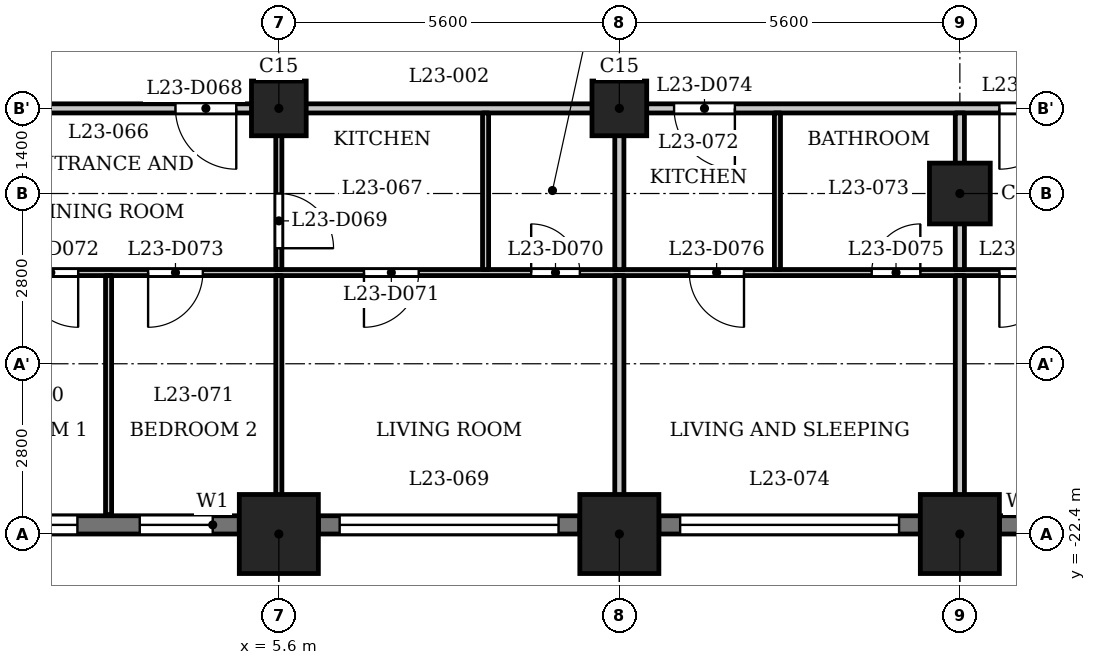
"""IFC4 building model, lengths in metres.
Left out: names, types, materials, properties, quantities, classifications, styles, units other than length and angle.
Written with IfcOpenShell. Run it as: python <this file> out.ifc"""

import sys

from ifc_helpers import new_model, si_unit, direction, frame, frame_2d, origin, origin_2d, place, context, subcontext, project, spatial, rectangle, extrude, element, fill, save


model = new_model("IFC4")
c1 = context("Model", 3, precision=1e-05, world=origin(), true_north=direction((0.0, 1.0)))
c2 = subcontext(c1, "Body", "Model", "MODEL_VIEW")
j1 = project(units=[si_unit("LENGTHUNIT", "METRE"), si_unit("PLANEANGLEUNIT", "RADIAN")], contexts=[c1])
p1 = place(None, origin())
s1 = spatial("IfcSite", under=j1, at=p1, CompositionType="ELEMENT")
p2 = place(p1, origin())
s2 = spatial("IfcBuilding", under=s1, at=p2, CompositionType="ELEMENT")
p3 = place(p2, frame((0.0, 0.0, 93.8)))
s3 = spatial("IfcBuildingStorey", under=s2, at=p3, CompositionType="ELEMENT", Elevation=93.8)
for number, where, z_axis, x_axis in (
    (1, (5.6, -22.4, 0.0), (0.0, 0.0, 1.0), (1.0, 0.0, 0.0)),
    (2, (11.2, -22.4, 0.0), (0.0, 0.0, 1.0), (1.0, 0.0, 0.0)),
    (3, (16.8, -22.4, 0.0), (0.0, 0.0, 1.0), (1.0, 0.0, 0.0)),
):
    element("IfcColumn", number, at=place(p3, frame(where, z_axis=z_axis, x_axis=x_axis)), inside=s3, PredefinedType="COLUMN", context=c2, shape_type="SweptSolid", body=[
        extrude(rectangle(XDim=1.3, YDim=1.3, at=origin_2d()), origin(), (0.0, 0.0, 1.0), 3.5),
    ])
p4 = place(p3, frame((16.8, -16.8, 0.0), z_axis=(0.0, 0.0, 1.0), x_axis=(1.0, 0.0, 0.0)))
e4 = element("IfcColumn", 4, at=p4, inside=s3, PredefinedType="COLUMN", context=c2, shape_type="SweptSolid", body=[
    extrude(rectangle(XDim=1.0, YDim=1.0, at=origin_2d()), origin(), (0.0, 0.0, 1.0), 3.5),
])
for number, where, z_axis, x_axis in (
    (5, (5.6, -15.4, 0.0), (0.0, 0.0, 1.0), (1.0, 0.0, 0.0)),
    (6, (11.2, -15.4, 0.0), (0.0, 0.0, 1.0), (1.0, 0.0, 0.0)),
):
    element("IfcColumn", number, at=place(p3, frame(where, z_axis=z_axis, x_axis=x_axis)), inside=s3, PredefinedType="COLUMN", context=c2, shape_type="SweptSolid", body=[
        extrude(rectangle(XDim=0.9, YDim=0.9, at=origin_2d()), origin(), (0.0, 0.0, 1.0), 3.5),
    ])
p5 = place(p3, frame((0.65, -22.25, 0.0), z_axis=(0.0, 0.0, 1.0), x_axis=(1.0, 0.0, 0.0)))
e7 = element("IfcWall", 7, at=p5, inside=s3, PredefinedType="SOLIDWALL", context=c2, shape_type="SweptSolid", body=[
    extrude(rectangle(XDim=4.3, YDim=0.3, at=frame_2d((2.15, 0.0))), origin(), (0.0, 0.0, 1.0), 2.4),
])
p6 = place(p5, frame((0.438, 0.0, 0.6)))
e8 = element("IfcOpeningElement", 8, at=p6, cuts=e7, PredefinedType="OPENING", context=c2, shape_type="SweptSolid", body=[
    extrude(rectangle(XDim=1.2, YDim=1.55, at=frame_2d((0.6, 0.775))), frame((0.0, 0.16, 0.0), z_axis=(0.0, -1.0, 0.0), x_axis=(1.0, 0.0, 0.0)), (0.0, 0.0, 1.0), 0.32),
])
p7 = place(p5, frame((2.663, 0.0, 0.6)))
e9 = element("IfcOpeningElement", 9, at=p7, cuts=e7, PredefinedType="OPENING", context=c2, shape_type="SweptSolid", body=[
    extrude(rectangle(XDim=1.2, YDim=1.55, at=frame_2d((0.6, 0.775))), frame((0.0, 0.16, 0.0), z_axis=(0.0, -1.0, 0.0), x_axis=(1.0, 0.0, 0.0)), (0.0, 0.0, 1.0), 0.32),
])
p8 = place(p3, frame((6.25, -22.25, 0.0), z_axis=(0.0, 0.0, 1.0), x_axis=(1.0, 0.0, 0.0)))
e10 = element("IfcWall", 10, at=p8, inside=s3, PredefinedType="SOLIDWALL", context=c2, shape_type="SweptSolid", body=[
    extrude(rectangle(XDim=4.3, YDim=0.3, at=frame_2d((2.15, 0.0))), origin(), (0.0, 0.0, 1.0), 2.4),
])
p9 = place(p8, frame((0.35, 0.0, 1.2)))
e11 = element("IfcOpeningElement", 11, at=p9, cuts=e10, PredefinedType="OPENING", context=c2, shape_type="SweptSolid", body=[
    extrude(rectangle(XDim=3.6, YDim=0.95, at=frame_2d((1.8, 0.475))), frame((0.0, 0.16, 0.0), z_axis=(0.0, -1.0, 0.0), x_axis=(1.0, 0.0, 0.0)), (0.0, 0.0, 1.0), 0.32),
])
p10 = place(p3, frame((11.85, -22.25, 0.0), z_axis=(0.0, 0.0, 1.0), x_axis=(1.0, 0.0, 0.0)))
e12 = element("IfcWall", 12, at=p10, inside=s3, PredefinedType="SOLIDWALL", context=c2, shape_type="SweptSolid", body=[
    extrude(rectangle(XDim=4.3, YDim=0.3, at=frame_2d((2.15, 0.0))), origin(), (0.0, 0.0, 1.0), 2.4),
])
p11 = place(p10, frame((0.35, 0.0, 1.2)))
e13 = element("IfcOpeningElement", 13, at=p11, cuts=e12, PredefinedType="OPENING", context=c2, shape_type="SweptSolid", body=[
    extrude(rectangle(XDim=3.6, YDim=0.95, at=frame_2d((1.8, 0.475))), frame((0.0, 0.16, 0.0), z_axis=(0.0, -1.0, 0.0), x_axis=(1.0, 0.0, 0.0)), (0.0, 0.0, 1.0), 0.32),
])
p12 = place(p3, frame((17.45, -22.25, 0.0), z_axis=(0.0, 0.0, 1.0), x_axis=(1.0, 0.0, 0.0)))
e14 = element("IfcWall", 14, at=p12, inside=s3, PredefinedType="SOLIDWALL", context=c2, shape_type="SweptSolid", body=[
    extrude(rectangle(XDim=2.55, YDim=0.3, at=frame_2d((1.275, 0.0))), origin(), (0.0, 0.0, 1.0), 2.4),
])
p13 = place(p12, frame((0.375, 0.0, 0.9)))
e15 = element("IfcOpeningElement", 15, at=p13, cuts=e14, PredefinedType="OPENING", context=c2, shape_type="SweptSolid", body=[
    extrude(rectangle(XDim=1.8, YDim=1.25, at=frame_2d((0.9, 0.625))), frame((0.0, 0.16, 0.0), z_axis=(0.0, -1.0, 0.0), x_axis=(1.0, 0.0, 0.0)), (0.0, 0.0, 1.0), 0.32),
])
p14 = place(p3, frame((-26.19, -18.1, 0.0), z_axis=(0.0, 0.0, 1.0), x_axis=(1.0, 0.0, 0.0)))
e16 = element("IfcWall", 16, at=p14, inside=s3, PredefinedType="PARTITIONING", context=c2, shape_type="SweptSolid", body=[
    extrude(rectangle(XDim=52.63, YDim=0.1, at=frame_2d((26.315, 0.0))), origin(), (0.0, 0.0, 1.0), 3.2),
])
p15 = place(p14, frame((1.09, 0.0, 0.0)))
e17 = element("IfcOpeningElement", 17, at=p15, cuts=e16, PredefinedType="OPENING", context=c2, shape_type="SweptSolid", body=[
    extrude(rectangle(XDim=0.8, YDim=2.1, at=frame_2d((0.4, 1.05))), frame((0.0, 0.06, 0.0), z_axis=(0.0, -1.0, 0.0), x_axis=(1.0, 0.0, 0.0)), (0.0, 0.0, 1.0), 0.12),
])
p16 = place(p14, frame((4.44, 0.0, 0.0)))
e18 = element("IfcOpeningElement", 18, at=p16, cuts=e16, PredefinedType="OPENING", context=c2, shape_type="SweptSolid", body=[
    extrude(rectangle(XDim=0.9, YDim=2.1, at=frame_2d((0.45, 1.05))), frame((0.0, 0.06, 0.0), z_axis=(0.0, -1.0, 0.0), x_axis=(1.0, 0.0, 0.0)), (0.0, 0.0, 1.0), 0.12),
])
p17 = place(p14, frame((10.04, 0.0, 0.0)))
e19 = element("IfcOpeningElement", 19, at=p17, cuts=e16, PredefinedType="OPENING", context=c2, shape_type="SweptSolid", body=[
    extrude(rectangle(XDim=0.8, YDim=2.1, at=frame_2d((0.4, 1.05))), frame((0.0, 0.06, 0.0), z_axis=(0.0, -1.0, 0.0), x_axis=(1.0, 0.0, 0.0)), (0.0, 0.0, 1.0), 0.12),
])
p18 = place(p14, frame((15.64, 0.0, 0.0)))
e20 = element("IfcOpeningElement", 20, at=p18, cuts=e16, PredefinedType="OPENING", context=c2, shape_type="SweptSolid", body=[
    extrude(rectangle(XDim=0.9, YDim=2.1, at=frame_2d((0.45, 1.05))), frame((0.0, 0.06, 0.0), z_axis=(0.0, -1.0, 0.0), x_axis=(1.0, 0.0, 0.0)), (0.0, 0.0, 1.0), 0.12),
])
p19 = place(p14, frame((24.74, 0.0, 0.0)))
e21 = element("IfcOpeningElement", 21, at=p19, cuts=e16, PredefinedType="OPENING", context=c2, shape_type="SweptSolid", body=[
    extrude(rectangle(XDim=0.8, YDim=2.1, at=frame_2d((0.4, 1.05))), frame((0.0, 0.06, 0.0), z_axis=(0.0, -1.0, 0.0), x_axis=(1.0, 0.0, 0.0)), (0.0, 0.0, 1.0), 0.12),
])
p20 = place(p14, frame((21.24, 0.0, 0.0)))
e22 = element("IfcOpeningElement", 22, at=p20, cuts=e16, PredefinedType="OPENING", context=c2, shape_type="SweptSolid", body=[
    extrude(rectangle(XDim=0.9, YDim=2.1, at=frame_2d((0.45, 1.05))), frame((0.0, 0.06, 0.0), z_axis=(0.0, -1.0, 0.0), x_axis=(1.0, 0.0, 0.0)), (0.0, 0.0, 1.0), 0.12),
])
p21 = place(p14, frame((35.94, 0.0, 0.0)))
e23 = element("IfcOpeningElement", 23, at=p21, cuts=e16, PredefinedType="OPENING", context=c2, shape_type="SweptSolid", body=[
    extrude(rectangle(XDim=0.8, YDim=2.1, at=frame_2d((0.4, 1.05))), frame((0.0, 0.06, 0.0), z_axis=(0.0, -1.0, 0.0), x_axis=(1.0, 0.0, 0.0)), (0.0, 0.0, 1.0), 0.12),
])
p22 = place(p14, frame((33.19, 0.0, 0.0)))
e24 = element("IfcOpeningElement", 24, at=p22, cuts=e16, PredefinedType="OPENING", context=c2, shape_type="SweptSolid", body=[
    extrude(rectangle(XDim=0.9, YDim=2.1, at=frame_2d((0.45, 1.05))), frame((0.0, 0.06, 0.0), z_axis=(0.0, -1.0, 0.0), x_axis=(1.0, 0.0, 0.0)), (0.0, 0.0, 1.0), 0.12),
])
p23 = place(p14, frame((27.59, 0.0, 0.0)))
e25 = element("IfcOpeningElement", 25, at=p23, cuts=e16, PredefinedType="OPENING", context=c2, shape_type="SweptSolid", body=[
    extrude(rectangle(XDim=0.9, YDim=2.1, at=frame_2d((0.45, 1.05))), frame((0.0, 0.06, 0.0), z_axis=(0.0, -1.0, 0.0), x_axis=(1.0, 0.0, 0.0)), (0.0, 0.0, 1.0), 0.12),
])
p24 = place(p14, frame((29.64, 0.0, 0.0)))
e26 = element("IfcOpeningElement", 26, at=p24, cuts=e16, PredefinedType="OPENING", context=c2, shape_type="SweptSolid", body=[
    extrude(rectangle(XDim=0.9, YDim=2.1, at=frame_2d((0.45, 1.05))), frame((0.0, 0.06, 0.0), z_axis=(0.0, -1.0, 0.0), x_axis=(1.0, 0.0, 0.0)), (0.0, 0.0, 1.0), 0.12),
])
p25 = place(p14, frame((41.54, 0.0, 0.0)))
e27 = element("IfcOpeningElement", 27, at=p25, cuts=e16, PredefinedType="OPENING", context=c2, shape_type="SweptSolid", body=[
    extrude(rectangle(XDim=0.8, YDim=2.1, at=frame_2d((0.4, 1.05))), frame((0.0, 0.06, 0.0), z_axis=(0.0, -1.0, 0.0), x_axis=(1.0, 0.0, 0.0)), (0.0, 0.0, 1.0), 0.12),
])
p26 = place(p14, frame((38.54, 0.0, 0.0)))
e28 = element("IfcOpeningElement", 28, at=p26, cuts=e16, PredefinedType="OPENING", context=c2, shape_type="SweptSolid", body=[
    extrude(rectangle(XDim=0.9, YDim=2.1, at=frame_2d((0.45, 1.05))), frame((0.0, 0.06, 0.0), z_axis=(0.0, -1.0, 0.0), x_axis=(1.0, 0.0, 0.0)), (0.0, 0.0, 1.0), 0.12),
])
p27 = place(p14, frame((49.204, 0.0, 0.0)))
e29 = element("IfcOpeningElement", 29, at=p27, cuts=e16, PredefinedType="OPENING", context=c2, shape_type="SweptSolid", body=[
    extrude(rectangle(XDim=0.8, YDim=2.1, at=frame_2d((0.4, 1.05))), frame((0.0, 0.06, 0.0), z_axis=(0.0, -1.0, 0.0), x_axis=(1.0, 0.0, 0.0)), (0.0, 0.0, 1.0), 0.12),
])
p28 = place(p14, frame((43.64, 0.0, 0.0)))
e30 = element("IfcOpeningElement", 30, at=p28, cuts=e16, PredefinedType="OPENING", context=c2, shape_type="SweptSolid", body=[
    extrude(rectangle(XDim=0.9, YDim=2.1, at=frame_2d((0.45, 1.05))), frame((0.0, 0.06, 0.0), z_axis=(0.0, -1.0, 0.0), x_axis=(1.0, 0.0, 0.0)), (0.0, 0.0, 1.0), 0.12),
])
p29 = place(p3, frame((-27.484, -15.4, 0.0), z_axis=(0.0, 0.0, 1.0), x_axis=(1.0, 0.0, 0.0)))
e31 = element("IfcWall", 31, at=p29, inside=s3, PredefinedType="PARTITIONING", context=c2, shape_type="SweptSolid", body=[
    extrude(rectangle(XDim=54.968, YDim=0.15, at=frame_2d((27.484, 0.0))), origin(), (0.0, 0.0, 1.0), 3.2),
])
p30 = place(p29, frame((5.734, 0.0, 0.0)))
e32 = element("IfcOpeningElement", 32, at=p30, cuts=e31, PredefinedType="OPENING", context=c2, shape_type="SweptSolid", body=[
    extrude(rectangle(XDim=1.0, YDim=2.1, at=frame_2d((0.5, 1.05))), frame((0.0, 0.085, 0.0), z_axis=(0.0, -1.0, 0.0), x_axis=(1.0, 0.0, 0.0)), (0.0, 0.0, 1.0), 0.17),
])
p31 = place(p29, frame((16.934, 0.0, 0.0)))
e33 = element("IfcOpeningElement", 33, at=p31, cuts=e31, PredefinedType="OPENING", context=c2, shape_type="SweptSolid", body=[
    extrude(rectangle(XDim=1.0, YDim=2.1, at=frame_2d((0.5, 1.05))), frame((0.0, 0.085, 0.0), z_axis=(0.0, -1.0, 0.0), x_axis=(1.0, 0.0, 0.0)), (0.0, 0.0, 1.0), 0.17),
])
p32 = place(p29, frame((22.534, 0.0, 0.0)))
e34 = element("IfcOpeningElement", 34, at=p32, cuts=e31, PredefinedType="OPENING", context=c2, shape_type="SweptSolid", body=[
    extrude(rectangle(XDim=1.0, YDim=2.1, at=frame_2d((0.5, 1.05))), frame((0.0, 0.085, 0.0), z_axis=(0.0, -1.0, 0.0), x_axis=(1.0, 0.0, 0.0)), (0.0, 0.0, 1.0), 0.17),
])
p33 = place(p29, frame((31.384, 0.0, 0.0)))
e35 = element("IfcOpeningElement", 35, at=p33, cuts=e31, PredefinedType="OPENING", context=c2, shape_type="SweptSolid", body=[
    extrude(rectangle(XDim=1.0, YDim=2.1, at=frame_2d((0.5, 1.05))), frame((0.0, 0.085, 0.0), z_axis=(0.0, -1.0, 0.0), x_axis=(1.0, 0.0, 0.0)), (0.0, 0.0, 1.0), 0.17),
])
p34 = place(p29, frame((39.584, 0.0, 0.0)))
e36 = element("IfcOpeningElement", 36, at=p34, cuts=e31, PredefinedType="OPENING", context=c2, shape_type="SweptSolid", body=[
    extrude(rectangle(XDim=1.0, YDim=2.1, at=frame_2d((0.5, 1.05))), frame((0.0, 0.085, 0.0), z_axis=(0.0, -1.0, 0.0), x_axis=(1.0, 0.0, 0.0)), (0.0, 0.0, 1.0), 0.17),
])
p35 = place(p29, frame((44.934, 0.0, 0.0)))
e37 = element("IfcOpeningElement", 37, at=p35, cuts=e31, PredefinedType="OPENING", context=c2, shape_type="SweptSolid", body=[
    extrude(rectangle(XDim=1.0, YDim=2.1, at=frame_2d((0.5, 1.05))), frame((0.0, 0.085, 0.0), z_axis=(0.0, -1.0, 0.0), x_axis=(1.0, 0.0, 0.0)), (0.0, 0.0, 1.0), 0.17),
])
p36 = place(p3, frame((2.8, -22.08, 0.0), z_axis=(0.0, 0.0, 1.0), x_axis=(0.0, 1.0, 0.0)))
e38 = element("IfcWall", 38, at=p36, inside=s3, PredefinedType="PARTITIONING", context=c2, shape_type="SweptSolid", body=[
    extrude(rectangle(XDim=3.93, YDim=0.1, at=frame_2d((1.965, 0.0))), origin(), (0.0, 0.0, 1.0), 3.2),
])
p37 = place(p3, frame((5.6, -23.03, 0.0), z_axis=(0.0, 0.0, 1.0), x_axis=(0.0, 1.0, 0.0)))
e39 = element("IfcWall", 39, at=p37, inside=s3, PredefinedType="PARTITIONING", context=c2, shape_type="SweptSolid", body=[
    extrude(rectangle(XDim=4.88, YDim=0.1, at=frame_2d((2.44, 0.0))), origin(), (0.0, 0.0, 1.0), 3.2),
])
p38 = place(p3, frame((5.6, -18.05, 0.0), z_axis=(0.0, 0.0, 1.0), x_axis=(0.0, 1.0, 0.0)))
e40 = element("IfcWall", 40, at=p38, inside=s3, PredefinedType="PARTITIONING", context=c2, shape_type="SweptSolid", body=[
    extrude(rectangle(XDim=2.575, YDim=0.1, at=frame_2d((1.288, 0.0))), origin(), (0.0, 0.0, 1.0), 3.2),
])
p39 = place(p38, frame((0.35, 0.0, 0.0)))
e41 = element("IfcOpeningElement", 41, at=p39, cuts=e40, PredefinedType="OPENING", context=c2, shape_type="SweptSolid", body=[
    extrude(rectangle(XDim=0.9, YDim=2.1, at=frame_2d((0.45, 1.05))), frame((0.0, 0.06, 0.0), z_axis=(0.0, -1.0, 0.0), x_axis=(1.0, 0.0, 0.0)), (0.0, 0.0, 1.0), 0.12),
])
p40 = place(p3, frame((9.0, -18.05, 0.0), z_axis=(0.0, 0.0, 1.0), x_axis=(0.0, 1.0, 0.0)))
e42 = element("IfcWall", 42, at=p40, inside=s3, PredefinedType="PARTITIONING", context=c2, shape_type="SweptSolid", body=[
    extrude(rectangle(XDim=2.575, YDim=0.1, at=frame_2d((1.288, 0.0))), origin(), (0.0, 0.0, 1.0), 3.2),
])
p41 = place(p3, frame((11.2, -23.03, 0.0), z_axis=(0.0, 0.0, 1.0), x_axis=(0.0, 1.0, 0.0)))
e43 = element("IfcWall", 43, at=p41, inside=s3, PredefinedType="PARTITIONING", context=c2, shape_type="SweptSolid", body=[
    extrude(rectangle(XDim=4.88, YDim=0.15, at=frame_2d((2.44, 0.0))), origin(), (0.0, 0.0, 1.0), 3.2),
])
p42 = place(p3, frame((11.2, -18.05, 0.0), z_axis=(0.0, 0.0, 1.0), x_axis=(0.0, 1.0, 0.0)))
e44 = element("IfcWall", 44, at=p42, inside=s3, PredefinedType="PARTITIONING", context=c2, shape_type="SweptSolid", body=[
    extrude(rectangle(XDim=2.575, YDim=0.15, at=frame_2d((1.288, 0.0))), origin(), (0.0, 0.0, 1.0), 3.2),
])
p43 = place(p3, frame((13.8, -18.05, 0.0), z_axis=(0.0, 0.0, 1.0), x_axis=(0.0, 1.0, 0.0)))
e45 = element("IfcWall", 45, at=p43, inside=s3, PredefinedType="PARTITIONING", context=c2, shape_type="SweptSolid", body=[
    extrude(rectangle(XDim=2.575, YDim=0.1, at=frame_2d((1.288, 0.0))), origin(), (0.0, 0.0, 1.0), 3.2),
])
p44 = place(p3, frame((16.8, -23.03, 0.0), z_axis=(0.0, 0.0, 1.0), x_axis=(0.0, 1.0, 0.0)))
e46 = element("IfcWall", 46, at=p44, inside=s3, PredefinedType="PARTITIONING", context=c2, shape_type="SweptSolid", body=[
    extrude(rectangle(XDim=4.88, YDim=0.15, at=frame_2d((2.44, 0.0))), origin(), (0.0, 0.0, 1.0), 3.2),
])
p45 = place(p3, frame((16.8, -18.05, 0.0), z_axis=(0.0, 0.0, 1.0), x_axis=(0.0, 1.0, 0.0)))
e47 = element("IfcWall", 47, at=p45, inside=s3, PredefinedType="PARTITIONING", context=c2, shape_type="SweptSolid", body=[
    extrude(rectangle(XDim=2.575, YDim=0.15, at=frame_2d((1.288, 0.0))), origin(), (0.0, 0.0, 1.0), 3.2),
])
p46 = place(p33, origin())
e48 = element("IfcDoor", 48, at=p46, inside=s3, OperationType="SINGLE_SWING_RIGHT", PredefinedType="DOOR", context=c2, shape_type="SweptSolid", body=[
    extrude(rectangle(XDim=1.0, YDim=2.1, at=frame_2d((0.5, 1.05))), frame((0.0, 0.025, 0.0), z_axis=(0.0, -1.0, 0.0), x_axis=(1.0, 0.0, 0.0)), (0.0, 0.0, 1.0), 0.05),
])
fill(e35, e48)
p47 = place(p39, origin())
e49 = element("IfcDoor", 49, at=p47, inside=s3, OperationType="SINGLE_SWING_LEFT", PredefinedType="DOOR", context=c2, shape_type="SweptSolid", body=[
    extrude(rectangle(XDim=0.9, YDim=2.1, at=frame_2d((0.45, 1.05))), frame((0.0, 0.025, 0.0), z_axis=(0.0, -1.0, 0.0), x_axis=(1.0, 0.0, 0.0)), (0.0, 0.0, 1.0), 0.05),
])
fill(e41, e49)
p48 = place(p21, origin())
e50 = element("IfcDoor", 50, at=p48, inside=s3, OperationType="SINGLE_SWING_RIGHT", PredefinedType="DOOR", context=c2, shape_type="SweptSolid", body=[
    extrude(rectangle(XDim=0.8, YDim=2.1, at=frame_2d((0.4, 1.05))), frame((0.0, 0.025, 0.0), z_axis=(0.0, -1.0, 0.0), x_axis=(1.0, 0.0, 0.0)), (0.0, 0.0, 1.0), 0.05),
])
fill(e23, e50)
p49 = place(p22, origin())
e51 = element("IfcDoor", 51, at=p49, inside=s3, OperationType="SINGLE_SWING_LEFT", PredefinedType="DOOR", context=c2, shape_type="SweptSolid", body=[
    extrude(rectangle(XDim=0.9, YDim=2.1, at=frame_2d((0.45, 1.05))), frame((0.0, 0.025, 0.0), z_axis=(0.0, -1.0, 0.0), x_axis=(1.0, 0.0, 0.0)), (0.0, 0.0, 1.0), 0.05),
])
fill(e24, e51)
p50 = place(p23, origin())
e52 = element("IfcDoor", 52, at=p50, inside=s3, OperationType="SINGLE_SWING_RIGHT", PredefinedType="DOOR", context=c2, shape_type="SweptSolid", body=[
    extrude(rectangle(XDim=0.9, YDim=2.1, at=frame_2d((0.45, 1.05))), frame((0.0, 0.025, 0.0), z_axis=(0.0, -1.0, 0.0), x_axis=(1.0, 0.0, 0.0)), (0.0, 0.0, 1.0), 0.05),
])
fill(e25, e52)
p51 = place(p24, origin())
e53 = element("IfcDoor", 53, at=p51, inside=s3, OperationType="SINGLE_SWING_LEFT", PredefinedType="DOOR", context=c2, shape_type="SweptSolid", body=[
    extrude(rectangle(XDim=0.9, YDim=2.1, at=frame_2d((0.45, 1.05))), frame((0.0, 0.025, 0.0), z_axis=(0.0, -1.0, 0.0), x_axis=(1.0, 0.0, 0.0)), (0.0, 0.0, 1.0), 0.05),
])
fill(e26, e53)
p52 = place(p34, origin())
e54 = element("IfcDoor", 54, at=p52, inside=s3, OperationType="SINGLE_SWING_RIGHT", PredefinedType="DOOR", context=c2, shape_type="SweptSolid", body=[
    extrude(rectangle(XDim=1.0, YDim=2.1, at=frame_2d((0.5, 1.05))), frame((0.0, 0.025, 0.0), z_axis=(0.0, -1.0, 0.0), x_axis=(1.0, 0.0, 0.0)), (0.0, 0.0, 1.0), 0.05),
])
fill(e36, e54)
p53 = place(p25, origin())
e55 = element("IfcDoor", 55, at=p53, inside=s3, OperationType="SINGLE_SWING_LEFT", PredefinedType="DOOR", context=c2, shape_type="SweptSolid", body=[
    extrude(rectangle(XDim=0.8, YDim=2.1, at=frame_2d((0.4, 1.05))), frame((0.0, 0.025, 0.0), z_axis=(0.0, -1.0, 0.0), x_axis=(1.0, 0.0, 0.0)), (0.0, 0.0, 1.0), 0.05),
])
fill(e27, e55)
p54 = place(p26, origin())
e56 = element("IfcDoor", 56, at=p54, inside=s3, OperationType="SINGLE_SWING_RIGHT", PredefinedType="DOOR", context=c2, shape_type="SweptSolid", body=[
    extrude(rectangle(XDim=0.9, YDim=2.1, at=frame_2d((0.45, 1.05))), frame((0.0, 0.025, 0.0), z_axis=(0.0, -1.0, 0.0), x_axis=(1.0, 0.0, 0.0)), (0.0, 0.0, 1.0), 0.05),
])
fill(e28, e56)
p55 = place(p35, origin())
e57 = element("IfcDoor", 57, at=p55, inside=s3, OperationType="SINGLE_SWING_LEFT", PredefinedType="DOOR", context=c2, shape_type="SweptSolid", body=[
    extrude(rectangle(XDim=1.0, YDim=2.1, at=frame_2d((0.5, 1.05))), frame((0.0, 0.025, 0.0), z_axis=(0.0, -1.0, 0.0), x_axis=(1.0, 0.0, 0.0)), (0.0, 0.0, 1.0), 0.05),
])
fill(e37, e57)
p56 = place(p28, origin())
e58 = element("IfcDoor", 58, at=p56, inside=s3, OperationType="SINGLE_SWING_LEFT", PredefinedType="DOOR", context=c2, shape_type="SweptSolid", body=[
    extrude(rectangle(XDim=0.9, YDim=2.1, at=frame_2d((0.45, 1.05))), frame((0.0, 0.025, 0.0), z_axis=(0.0, -1.0, 0.0), x_axis=(1.0, 0.0, 0.0)), (0.0, 0.0, 1.0), 0.05),
])
fill(e30, e58)
p57 = place(p6, origin())
e59 = element("IfcWindow", 59, at=p57, inside=s3, PartitioningType="SINGLE_PANEL", PredefinedType="WINDOW", context=c2, shape_type="SweptSolid", body=[
    extrude(rectangle(XDim=1.2, YDim=1.55, at=frame_2d((0.6, 0.775))), frame((0.0, 0.03, 0.0), z_axis=(0.0, -1.0, 0.0), x_axis=(1.0, 0.0, 0.0)), (0.0, 0.0, 1.0), 0.06),
])
fill(e8, e59)
p58 = place(p7, origin())
e60 = element("IfcWindow", 60, at=p58, inside=s3, PartitioningType="SINGLE_PANEL", PredefinedType="WINDOW", context=c2, shape_type="SweptSolid", body=[
    extrude(rectangle(XDim=1.2, YDim=1.55, at=frame_2d((0.6, 0.775))), frame((0.0, 0.03, 0.0), z_axis=(0.0, -1.0, 0.0), x_axis=(1.0, 0.0, 0.0)), (0.0, 0.0, 1.0), 0.06),
])
fill(e9, e60)
p59 = place(p9, origin())
e61 = element("IfcWindow", 61, at=p59, inside=s3, PartitioningType="SINGLE_PANEL", PredefinedType="WINDOW", context=c2, shape_type="SweptSolid", body=[
    extrude(rectangle(XDim=3.6, YDim=0.95, at=frame_2d((1.8, 0.475))), frame((0.0, 0.03, 0.0), z_axis=(0.0, -1.0, 0.0), x_axis=(1.0, 0.0, 0.0)), (0.0, 0.0, 1.0), 0.06),
])
fill(e11, e61)
p60 = place(p11, origin())
e62 = element("IfcWindow", 62, at=p60, inside=s3, PartitioningType="SINGLE_PANEL", PredefinedType="WINDOW", context=c2, shape_type="SweptSolid", body=[
    extrude(rectangle(XDim=3.6, YDim=0.95, at=frame_2d((1.8, 0.475))), frame((0.0, 0.03, 0.0), z_axis=(0.0, -1.0, 0.0), x_axis=(1.0, 0.0, 0.0)), (0.0, 0.0, 1.0), 0.06),
])
fill(e13, e62)
save(model, sys.argv[1])
